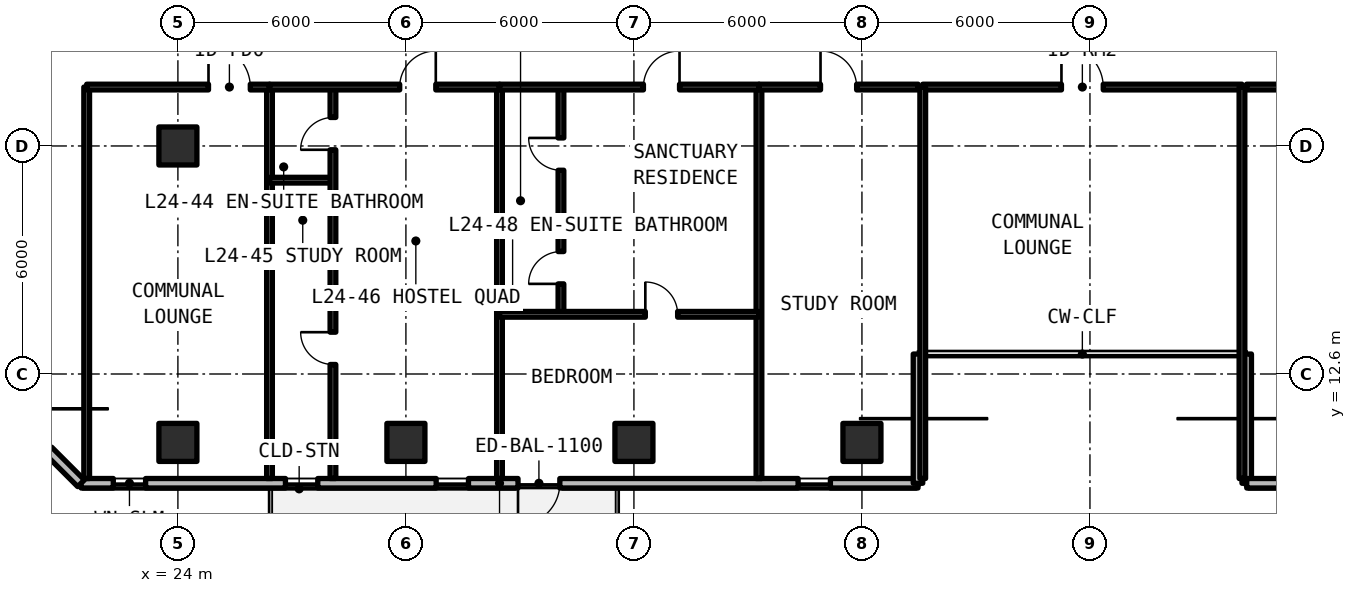
"""IFC4 building model, lengths in metres.
Left out: names, types, materials, properties, quantities, classifications, styles, units other than length and angle.
Written with IfcOpenShell. Run it as: python <this file> out.ifc"""

import sys

from ifc_helpers import new_model, si_unit, direction, frame, frame_2d, origin, origin_2d, place, context, subcontext, project, spatial, rectangle, extrude, element, fill, save


model = new_model("IFC4")
c1 = context("Model", 3, precision=1e-05, world=origin(), true_north=direction((0.0, 1.0)))
c2 = subcontext(c1, "Body", "Model", "MODEL_VIEW")
j1 = project(units=[si_unit("LENGTHUNIT", "METRE"), si_unit("PLANEANGLEUNIT", "RADIAN")], contexts=[c1])
p1 = place(None, origin())
s1 = spatial("IfcSite", under=j1, at=p1, CompositionType="ELEMENT")
p2 = place(p1, origin())
s2 = spatial("IfcBuilding", under=s1, at=p2, CompositionType="ELEMENT")
p3 = place(p2, frame((0.0, 0.0, 88.77)))
s3 = spatial("IfcBuildingStorey", under=s2, at=p3, CompositionType="ELEMENT", Elevation=88.77)
for number, where, z_axis, x_axis in (
    (1, (24.0, 18.6, 0.0), (0.0, 0.0, 1.0), (1.0, 0.0, 0.0)),
    (2, (24.0, 10.8, 0.0), (0.0, 0.0, 1.0), (1.0, 0.0, 0.0)),
    (3, (30.0, 10.8, 0.0), (0.0, 0.0, 1.0), (1.0, 0.0, 0.0)),
    (4, (36.0, 10.8, 0.0), (0.0, 0.0, 1.0), (1.0, 0.0, 0.0)),
    (5, (42.0, 10.8, 0.0), (0.0, 0.0, 1.0), (1.0, 0.0, 0.0)),
):
    element("IfcColumn", number, at=place(p3, frame(where, z_axis=z_axis, x_axis=x_axis)), inside=s3, PredefinedType="COLUMN", context=c2, shape_type="SweptSolid", body=[
        extrude(rectangle(XDim=1.0, YDim=1.0, at=origin_2d()), origin(), (0.0, 0.0, 1.0), 3.3),
    ])
p4 = place(p3, frame((21.452, 9.725, 0.0), z_axis=(0.0, 0.0, 1.0), x_axis=(1.0, 0.0, 0.0)))
e6 = element("IfcWall", 6, at=p4, inside=s3, PredefinedType="SOLIDWALL", context=c2, shape_type="SweptSolid", body=[
    extrude(rectangle(XDim=22.023, YDim=0.25, at=frame_2d((11.012, 0.0))), origin(), (0.0, 0.0, 1.0), 3.08),
])
p5 = place(p4, frame((11.498, 0.0, 0.0)))
e7 = element("IfcOpeningElement", 7, at=p5, cuts=e6, PredefinedType="OPENING", context=c2, shape_type="SweptSolid", body=[
    extrude(rectangle(XDim=1.1, YDim=2.15, at=frame_2d((0.55, 1.075))), frame((0.0, 0.135, 0.0), z_axis=(0.0, -1.0, 0.0), x_axis=(1.0, 0.0, 0.0)), (0.0, 0.0, 1.0), 0.27),
])
p6 = place(p4, frame((0.848, 0.0, 0.78)))
e8 = element("IfcOpeningElement", 8, at=p6, cuts=e6, PredefinedType="OPENING", context=c2, shape_type="SweptSolid", body=[
    extrude(rectangle(XDim=0.85, YDim=1.65, at=frame_2d((0.425, 0.825))), frame((0.0, 0.135, 0.0), z_axis=(0.0, -1.0, 0.0), x_axis=(1.0, 0.0, 0.0)), (0.0, 0.0, 1.0), 0.27),
])
p7 = place(p4, frame((5.378, 0.0, 0.78)))
e9 = element("IfcOpeningElement", 9, at=p7, cuts=e6, PredefinedType="OPENING", context=c2, shape_type="SweptSolid", body=[
    extrude(rectangle(XDim=0.85, YDim=1.65, at=frame_2d((0.425, 0.825))), frame((0.0, 0.135, 0.0), z_axis=(0.0, -1.0, 0.0), x_axis=(1.0, 0.0, 0.0)), (0.0, 0.0, 1.0), 0.27),
])
p8 = place(p4, frame((9.344, 0.0, 0.78)))
e10 = element("IfcOpeningElement", 10, at=p8, cuts=e6, PredefinedType="OPENING", context=c2, shape_type="SweptSolid", body=[
    extrude(rectangle(XDim=0.85, YDim=1.65, at=frame_2d((0.425, 0.825))), frame((0.0, 0.135, 0.0), z_axis=(0.0, -1.0, 0.0), x_axis=(1.0, 0.0, 0.0)), (0.0, 0.0, 1.0), 0.27),
])
p9 = place(p4, frame((18.868, 0.0, 0.78)))
e11 = element("IfcOpeningElement", 11, at=p9, cuts=e6, PredefinedType="OPENING", context=c2, shape_type="SweptSolid", body=[
    extrude(rectangle(XDim=0.85, YDim=1.65, at=frame_2d((0.425, 0.825))), frame((0.0, 0.135, 0.0), z_axis=(0.0, -1.0, 0.0), x_axis=(1.0, 0.0, 0.0)), (0.0, 0.0, 1.0), 0.27),
])
for number, where, z_axis, x_axis in (
    (12, (43.475, 9.725, 0.0), (0.0, 0.0, 1.0), (0.0, 1.0, 0.0)),
    (13, (52.125, 13.125, 0.0), (0.0, 0.0, 1.0), (0.0, -1.0, 0.0)),
):
    element("IfcWall", number, at=place(p3, frame(where, z_axis=z_axis, x_axis=x_axis)), inside=s3, PredefinedType="SOLIDWALL", context=c2, shape_type="SweptSolid", body=[
        extrude(rectangle(XDim=3.4, YDim=0.25, at=frame_2d((1.7, 0.0))), origin(), (0.0, 0.0, 1.0), 3.08),
    ])
p10 = place(p3, frame((52.125, 9.725, 0.0), z_axis=(0.0, 0.0, 1.0), x_axis=(1.0, 0.0, 0.0)))
e14 = element("IfcWall", 14, at=p10, inside=s3, PredefinedType="SOLIDWALL", context=c2, shape_type="SweptSolid", body=[
    extrude(rectangle(XDim=44.023, YDim=0.25, at=frame_2d((22.012, 0.0))), origin(), (0.0, 0.0, 1.0), 3.08),
])
p11 = place(p10, frame((10.875, 0.0, 0.0)))
e15 = element("IfcOpeningElement", 15, at=p11, cuts=e14, PredefinedType="OPENING", context=c2, shape_type="SweptSolid", body=[
    extrude(rectangle(XDim=1.1, YDim=2.15, at=frame_2d((0.55, 1.075))), frame((0.0, 0.135, 0.0), z_axis=(0.0, -1.0, 0.0), x_axis=(1.0, 0.0, 0.0)), (0.0, 0.0, 1.0), 0.27),
])
p12 = place(p10, frame((22.975, 0.0, 0.0)))
e16 = element("IfcOpeningElement", 16, at=p12, cuts=e14, PredefinedType="OPENING", context=c2, shape_type="SweptSolid", body=[
    extrude(rectangle(XDim=1.1, YDim=2.15, at=frame_2d((0.55, 1.075))), frame((0.0, 0.135, 0.0), z_axis=(0.0, -1.0, 0.0), x_axis=(1.0, 0.0, 0.0)), (0.0, 0.0, 1.0), 0.27),
])
p13 = place(p10, frame((35.075, 0.0, 0.0)))
e17 = element("IfcOpeningElement", 17, at=p13, cuts=e14, PredefinedType="OPENING", context=c2, shape_type="SweptSolid", body=[
    extrude(rectangle(XDim=1.1, YDim=2.15, at=frame_2d((0.55, 1.075))), frame((0.0, 0.135, 0.0), z_axis=(0.0, -1.0, 0.0), x_axis=(1.0, 0.0, 0.0)), (0.0, 0.0, 1.0), 0.27),
])
p14 = place(p10, frame((2.669, 0.0, 0.78)))
e18 = element("IfcOpeningElement", 18, at=p14, cuts=e14, PredefinedType="OPENING", context=c2, shape_type="SweptSolid", body=[
    extrude(rectangle(XDim=2.0, YDim=1.66, at=frame_2d((1.0, 0.83))), frame((0.0, 0.135, 0.0), z_axis=(0.0, -1.0, 0.0), x_axis=(1.0, 0.0, 0.0)), (0.0, 0.0, 1.0), 0.27),
])
p15 = place(p10, frame((8.314, 0.0, 0.78)))
e19 = element("IfcOpeningElement", 19, at=p15, cuts=e14, PredefinedType="OPENING", context=c2, shape_type="SweptSolid", body=[
    extrude(rectangle(XDim=0.85, YDim=1.65, at=frame_2d((0.425, 0.825))), frame((0.0, 0.135, 0.0), z_axis=(0.0, -1.0, 0.0), x_axis=(1.0, 0.0, 0.0)), (0.0, 0.0, 1.0), 0.27),
])
p16 = place(p10, frame((27.363, 0.0, 0.78)))
e20 = element("IfcOpeningElement", 20, at=p16, cuts=e14, PredefinedType="OPENING", context=c2, shape_type="SweptSolid", body=[
    extrude(rectangle(XDim=2.0, YDim=1.66, at=frame_2d((1.0, 0.83))), frame((0.0, 0.135, 0.0), z_axis=(0.0, -1.0, 0.0), x_axis=(1.0, 0.0, 0.0)), (0.0, 0.0, 1.0), 0.27),
])
p17 = place(p10, frame((40.048, 0.0, 0.78)))
e21 = element("IfcOpeningElement", 21, at=p17, cuts=e14, PredefinedType="OPENING", context=c2, shape_type="SweptSolid", body=[
    extrude(rectangle(XDim=2.0, YDim=1.66, at=frame_2d((1.0, 0.83))), frame((0.0, 0.135, 0.0), z_axis=(0.0, -1.0, 0.0), x_axis=(1.0, 0.0, 0.0)), (0.0, 0.0, 1.0), 0.27),
])
p18 = place(p3, frame((17.325, 13.852, 0.0), z_axis=(0.0, 0.0, 1.0), x_axis=(0.707127696864, -0.70708586489, 0.0)))
e22 = element("IfcWall", 22, at=p18, inside=s3, PredefinedType="SOLIDWALL", context=c2, shape_type="SweptSolid", body=[
    extrude(rectangle(XDim=5.836, YDim=0.25, at=frame_2d((2.918, 0.0))), origin(), (0.0, 0.0, 1.0), 3.08),
])
p19 = place(p18, frame((1.218, 0.0, 0.78)))
e23 = element("IfcOpeningElement", 23, at=p19, cuts=e22, PredefinedType="OPENING", context=c2, shape_type="SweptSolid", body=[
    extrude(rectangle(XDim=3.4, YDim=1.66, at=frame_2d((1.7, 0.83))), frame((0.0, 0.135, 0.0), z_axis=(0.0, -1.0, 0.0), x_axis=(1.0, 0.0, 0.0)), (0.0, 0.0, 1.0), 0.27),
])
p20 = place(p3, frame((43.6, 20.15, 0.0), z_axis=(0.0, 0.0, 1.0), x_axis=(1.0, 0.0, 0.0)))
e24 = element("IfcWall", 24, at=p20, inside=s3, PredefinedType="SOLIDWALL", context=c2, shape_type="SweptSolid", body=[
    extrude(rectangle(XDim=8.4, YDim=0.15, at=frame_2d((4.2, 0.0))), origin(), (0.0, 0.0, 1.0), 2.35),
])
p21 = place(p20, frame((3.65, 0.0, 0.0)))
e25 = element("IfcOpeningElement", 25, at=p21, cuts=e24, PredefinedType="OPENING", context=c2, shape_type="SweptSolid", body=[
    extrude(rectangle(XDim=1.1, YDim=2.15, at=frame_2d((0.55, 1.075))), frame((0.0, 0.085, 0.0), z_axis=(0.0, -1.0, 0.0), x_axis=(1.0, 0.0, 0.0)), (0.0, 0.0, 1.0), 0.17),
])
for number, where, z_axis, x_axis in (
    (26, (43.6, 9.85, 0.0), (0.0, 0.0, 1.0), (0.0, 1.0, 0.0)),
    (27, (52.0, 9.85, 0.0), (0.0, 0.0, 1.0), (0.0, 1.0, 0.0)),
    (28, (21.6, 9.85, 0.0), (0.0, 0.0, 1.0), (0.0, 1.0, 0.0)),
    (29, (26.41, 9.85, 0.0), (0.0, 0.0, 1.0), (0.0, 1.0, 0.0)),
):
    element("IfcWall", number, at=place(p3, frame(where, z_axis=z_axis, x_axis=x_axis)), inside=s3, PredefinedType="SOLIDWALL", context=c2, shape_type="SweptSolid", body=[
        extrude(rectangle(XDim=10.3, YDim=0.15, at=frame_2d((5.15, 0.0))), origin(), (0.0, 0.0, 1.0), 2.35),
    ])
p22 = place(p3, frame((21.6, 20.15, 0.0), z_axis=(0.0, 0.0, 1.0), x_axis=(1.0, 0.0, 0.0)))
e30 = element("IfcWall", 30, at=p22, inside=s3, PredefinedType="SOLIDWALL", context=c2, shape_type="SweptSolid", body=[
    extrude(rectangle(XDim=4.81, YDim=0.15, at=frame_2d((2.405, 0.0))), origin(), (0.0, 0.0, 1.0), 2.35),
])
p23 = place(p22, frame((3.205, 0.0, 0.0)))
e31 = element("IfcOpeningElement", 31, at=p23, cuts=e30, PredefinedType="OPENING", context=c2, shape_type="SweptSolid", body=[
    extrude(rectangle(XDim=1.1, YDim=2.15, at=frame_2d((0.55, 1.075))), frame((0.0, 0.085, 0.0), z_axis=(0.0, -1.0, 0.0), x_axis=(1.0, 0.0, 0.0)), (0.0, 0.0, 1.0), 0.17),
])
p24 = place(p3, frame((32.462, 9.85, 0.0), z_axis=(0.0, 0.0, 1.0), x_axis=(0.0, 1.0, 0.0)))
e32 = element("IfcWall", 32, at=p24, inside=s3, PredefinedType="SOLIDWALL", context=c2, shape_type="SweptSolid", body=[
    extrude(rectangle(XDim=10.3, YDim=0.15, at=frame_2d((5.15, 0.0))), origin(), (0.0, 0.0, 1.0), 2.35),
])
p25 = place(p3, frame((26.41, 17.7, 0.0), z_axis=(0.0, 0.0, 1.0), x_axis=(1.0, 0.0, 0.0)))
e33 = element("IfcWall", 33, at=p25, inside=s3, PredefinedType="PARTITIONING", context=c2, shape_type="SweptSolid", body=[
    extrude(rectangle(XDim=1.67, YDim=0.15, at=frame_2d((0.835, 0.0))), origin(), (0.0, 0.0, 1.0), 2.35),
])
p26 = place(p3, frame((28.08, 9.85, 0.0), z_axis=(0.0, 0.0, 1.0), x_axis=(0.0, 1.0, 0.0)))
e34 = element("IfcWall", 34, at=p26, inside=s3, PredefinedType="PARTITIONING", context=c2, shape_type="SweptSolid", body=[
    extrude(rectangle(XDim=10.3, YDim=0.15, at=frame_2d((5.15, 0.0))), origin(), (0.0, 0.0, 1.0), 2.35),
])
p27 = place(p26, frame((3.0, 0.0, 0.0)))
e35 = element("IfcOpeningElement", 35, at=p27, cuts=e34, PredefinedType="OPENING", context=c2, shape_type="SweptSolid", body=[
    extrude(rectangle(XDim=0.85, YDim=2.1, at=frame_2d((0.425, 1.05))), frame((0.0, 0.085, 0.0), z_axis=(0.0, -1.0, 0.0), x_axis=(1.0, 0.0, 0.0)), (0.0, 0.0, 1.0), 0.17),
])
p28 = place(p26, frame((8.65, 0.0, 0.0)))
e36 = element("IfcOpeningElement", 36, at=p28, cuts=e34, PredefinedType="OPENING", context=c2, shape_type="SweptSolid", body=[
    extrude(rectangle(XDim=0.85, YDim=2.1, at=frame_2d((0.425, 1.05))), frame((0.0, 0.085, 0.0), z_axis=(0.0, -1.0, 0.0), x_axis=(1.0, 0.0, 0.0)), (0.0, 0.0, 1.0), 0.17),
])
p29 = place(p3, frame((26.41, 20.15, 0.0), z_axis=(0.0, 0.0, 1.0), x_axis=(1.0, 0.0, 0.0)))
e37 = element("IfcWall", 37, at=p29, inside=s3, PredefinedType="SOLIDWALL", context=c2, shape_type="SweptSolid", body=[
    extrude(rectangle(XDim=6.052, YDim=0.15, at=frame_2d((3.026, 0.0))), origin(), (0.0, 0.0, 1.0), 2.35),
])
p30 = place(p29, frame((3.426, 0.0, 0.0)))
e38 = element("IfcOpeningElement", 38, at=p30, cuts=e37, PredefinedType="OPENING", context=c2, shape_type="SweptSolid", body=[
    extrude(rectangle(XDim=0.95, YDim=2.15, at=frame_2d((0.475, 1.075))), frame((0.0, 0.085, 0.0), z_axis=(0.0, -1.0, 0.0), x_axis=(1.0, 0.0, 0.0)), (0.0, 0.0, 1.0), 0.17),
])
p31 = place(p3, frame((39.29, 9.85, 0.0), z_axis=(0.0, 0.0, 1.0), x_axis=(0.0, 1.0, 0.0)))
e39 = element("IfcWall", 39, at=p31, inside=s3, PredefinedType="SOLIDWALL", context=c2, shape_type="SweptSolid", body=[
    extrude(rectangle(XDim=10.3, YDim=0.15, at=frame_2d((5.15, 0.0))), origin(), (0.0, 0.0, 1.0), 2.35),
])
p32 = place(p3, frame((32.462, 16.622, 0.0), z_axis=(0.0, 0.0, 1.0), x_axis=(1.0, 0.0, 0.0)))
e40 = element("IfcWall", 40, at=p32, inside=s3, PredefinedType="PARTITIONING", context=c2, shape_type="SweptSolid", body=[
    extrude(rectangle(XDim=1.618, YDim=0.15, at=frame_2d((0.809, 0.0))), origin(), (0.0, 0.0, 1.0), 2.35),
])
p33 = place(p3, frame((34.08, 14.171, 0.0), z_axis=(0.0, 0.0, 1.0), x_axis=(0.0, 1.0, 0.0)))
e41 = element("IfcWall", 41, at=p33, inside=s3, PredefinedType="PARTITIONING", context=c2, shape_type="SweptSolid", body=[
    extrude(rectangle(XDim=5.979, YDim=0.15, at=frame_2d((2.99, 0.0))), origin(), (0.0, 0.0, 1.0), 2.35),
])
p34 = place(p33, frame((0.801, 0.0, 0.0)))
e42 = element("IfcOpeningElement", 42, at=p34, cuts=e41, PredefinedType="OPENING", context=c2, shape_type="SweptSolid", body=[
    extrude(rectangle(XDim=0.85, YDim=2.1, at=frame_2d((0.425, 1.05))), frame((0.0, 0.085, 0.0), z_axis=(0.0, -1.0, 0.0), x_axis=(1.0, 0.0, 0.0)), (0.0, 0.0, 1.0), 0.17),
])
p35 = place(p33, frame((3.791, 0.0, 0.0)))
e43 = element("IfcOpeningElement", 43, at=p35, cuts=e41, PredefinedType="OPENING", context=c2, shape_type="SweptSolid", body=[
    extrude(rectangle(XDim=0.85, YDim=2.1, at=frame_2d((0.425, 1.05))), frame((0.0, 0.085, 0.0), z_axis=(0.0, -1.0, 0.0), x_axis=(1.0, 0.0, 0.0)), (0.0, 0.0, 1.0), 0.17),
])
p36 = place(p3, frame((32.462, 14.171, 0.0), z_axis=(0.0, 0.0, 1.0), x_axis=(1.0, 0.0, 0.0)))
e44 = element("IfcWall", 44, at=p36, inside=s3, PredefinedType="PARTITIONING", context=c2, shape_type="SweptSolid", body=[
    extrude(rectangle(XDim=6.828, YDim=0.15, at=frame_2d((3.414, 0.0))), origin(), (0.0, 0.0, 1.0), 2.35),
])
p37 = place(p36, frame((3.838, 0.0, 0.0)))
e45 = element("IfcOpeningElement", 45, at=p37, cuts=e44, PredefinedType="OPENING", context=c2, shape_type="SweptSolid", body=[
    extrude(rectangle(XDim=0.85, YDim=2.1, at=frame_2d((0.425, 1.05))), frame((0.0, 0.085, 0.0), z_axis=(0.0, -1.0, 0.0), x_axis=(1.0, 0.0, 0.0)), (0.0, 0.0, 1.0), 0.17),
])
p38 = place(p3, frame((32.462, 20.15, 0.0), z_axis=(0.0, 0.0, 1.0), x_axis=(1.0, 0.0, 0.0)))
e46 = element("IfcWall", 46, at=p38, inside=s3, PredefinedType="SOLIDWALL", context=c2, shape_type="SweptSolid", body=[
    extrude(rectangle(XDim=6.828, YDim=0.15, at=frame_2d((3.414, 0.0))), origin(), (0.0, 0.0, 1.0), 2.35),
])
p39 = place(p38, frame((3.788, 0.0, 0.0)))
e47 = element("IfcOpeningElement", 47, at=p39, cuts=e46, PredefinedType="OPENING", context=c2, shape_type="SweptSolid", body=[
    extrude(rectangle(XDim=0.95, YDim=2.15, at=frame_2d((0.475, 1.075))), frame((0.0, 0.085, 0.0), z_axis=(0.0, -1.0, 0.0), x_axis=(1.0, 0.0, 0.0)), (0.0, 0.0, 1.0), 0.17),
])
p40 = place(p3, frame((39.29, 20.15, 0.0), z_axis=(0.0, 0.0, 1.0), x_axis=(1.0, 0.0, 0.0)))
e48 = element("IfcWall", 48, at=p40, inside=s3, PredefinedType="SOLIDWALL", context=c2, shape_type="SweptSolid", body=[
    extrude(rectangle(XDim=4.19, YDim=0.15, at=frame_2d((2.095, 0.0))), origin(), (0.0, 0.0, 1.0), 2.35),
])
p41 = place(p40, frame((1.62, 0.0, 0.0)))
e49 = element("IfcOpeningElement", 49, at=p41, cuts=e48, PredefinedType="OPENING", context=c2, shape_type="SweptSolid", body=[
    extrude(rectangle(XDim=0.95, YDim=2.15, at=frame_2d((0.475, 1.075))), frame((0.0, 0.085, 0.0), z_axis=(0.0, -1.0, 0.0), x_axis=(1.0, 0.0, 0.0)), (0.0, 0.0, 1.0), 0.17),
])
p42 = place(p3, frame((52.12, 20.15, 0.0), z_axis=(0.0, 0.0, 1.0), x_axis=(1.0, 0.0, 0.0)))
e50 = element("IfcWall", 50, at=p42, inside=s3, PredefinedType="SOLIDWALL", context=c2, shape_type="SweptSolid", body=[
    extrude(rectangle(XDim=6.708, YDim=0.15, at=frame_2d((3.354, 0.0))), origin(), (0.0, 0.0, 1.0), 2.35),
])
p43 = place(p42, frame((2.879, 0.0, 0.0)))
e51 = element("IfcOpeningElement", 51, at=p43, cuts=e50, PredefinedType="OPENING", context=c2, shape_type="SweptSolid", body=[
    extrude(rectangle(XDim=0.95, YDim=2.15, at=frame_2d((0.475, 1.075))), frame((0.0, 0.085, 0.0), z_axis=(0.0, -1.0, 0.0), x_axis=(1.0, 0.0, 0.0)), (0.0, 0.0, 1.0), 0.17),
])
p44 = place(p5, frame((1.1, 0.0, 0.0), z_axis=(0.0, 0.0, 1.0), x_axis=(-1.0, 0.0, 0.0)))
e52 = element("IfcDoor", 52, at=p44, inside=s3, OperationType="SINGLE_SWING_RIGHT", PredefinedType="DOOR", context=c2, shape_type="SweptSolid", body=[
    extrude(rectangle(XDim=1.1, YDim=2.15, at=frame_2d((0.55, 1.075))), frame((0.0, 0.025, 0.0), z_axis=(0.0, -1.0, 0.0), x_axis=(1.0, 0.0, 0.0)), (0.0, 0.0, 1.0), 0.05),
])
fill(e7, e52)
p45 = place(p6, origin())
e53 = element("IfcWindow", 53, at=p45, inside=s3, PartitioningType="SINGLE_PANEL", PredefinedType="WINDOW", context=c2, shape_type="SweptSolid", body=[
    extrude(rectangle(XDim=0.85, YDim=1.65, at=frame_2d((0.425, 0.825))), frame((0.0, 0.03, 0.0), z_axis=(0.0, -1.0, 0.0), x_axis=(1.0, 0.0, 0.0)), (0.0, 0.0, 1.0), 0.06),
])
fill(e8, e53)
p46 = place(p7, origin())
e54 = element("IfcWindow", 54, at=p46, inside=s3, PartitioningType="SINGLE_PANEL", PredefinedType="WINDOW", context=c2, shape_type="SweptSolid", body=[
    extrude(rectangle(XDim=0.85, YDim=1.65, at=frame_2d((0.425, 0.825))), frame((0.0, 0.03, 0.0), z_axis=(0.0, -1.0, 0.0), x_axis=(1.0, 0.0, 0.0)), (0.0, 0.0, 1.0), 0.06),
])
fill(e9, e54)
p47 = place(p8, origin())
e55 = element("IfcWindow", 55, at=p47, inside=s3, PartitioningType="SINGLE_PANEL", PredefinedType="WINDOW", context=c2, shape_type="SweptSolid", body=[
    extrude(rectangle(XDim=0.85, YDim=1.65, at=frame_2d((0.425, 0.825))), frame((0.0, 0.03, 0.0), z_axis=(0.0, -1.0, 0.0), x_axis=(1.0, 0.0, 0.0)), (0.0, 0.0, 1.0), 0.06),
])
fill(e10, e55)
p48 = place(p9, origin())
e56 = element("IfcWindow", 56, at=p48, inside=s3, PartitioningType="SINGLE_PANEL", PredefinedType="WINDOW", context=c2, shape_type="SweptSolid", body=[
    extrude(rectangle(XDim=0.85, YDim=1.65, at=frame_2d((0.425, 0.825))), frame((0.0, 0.03, 0.0), z_axis=(0.0, -1.0, 0.0), x_axis=(1.0, 0.0, 0.0)), (0.0, 0.0, 1.0), 0.06),
])
fill(e11, e56)
p49 = place(p21, origin())
e57 = element("IfcDoor", 57, at=p49, inside=s3, OperationType="SINGLE_SWING_LEFT", PredefinedType="DOOR", context=c2, shape_type="SweptSolid", body=[
    extrude(rectangle(XDim=1.1, YDim=2.15, at=frame_2d((0.55, 1.075))), frame((0.0, 0.025, 0.0), z_axis=(0.0, -1.0, 0.0), x_axis=(1.0, 0.0, 0.0)), (0.0, 0.0, 1.0), 0.05),
])
fill(e25, e57)
p50 = place(p23, origin())
e58 = element("IfcDoor", 58, at=p50, inside=s3, OperationType="SINGLE_SWING_LEFT", PredefinedType="DOOR", context=c2, shape_type="SweptSolid", body=[
    extrude(rectangle(XDim=1.1, YDim=2.15, at=frame_2d((0.55, 1.075))), frame((0.0, 0.025, 0.0), z_axis=(0.0, -1.0, 0.0), x_axis=(1.0, 0.0, 0.0)), (0.0, 0.0, 1.0), 0.05),
])
fill(e31, e58)
p51 = place(p27, origin())
e59 = element("IfcDoor", 59, at=p51, inside=s3, OperationType="SINGLE_SWING_RIGHT", PredefinedType="DOOR", context=c2, shape_type="SweptSolid", body=[
    extrude(rectangle(XDim=0.85, YDim=2.1, at=frame_2d((0.425, 1.05))), frame((0.0, 0.025, 0.0), z_axis=(0.0, -1.0, 0.0), x_axis=(1.0, 0.0, 0.0)), (0.0, 0.0, 1.0), 0.05),
])
fill(e35, e59)
p52 = place(p28, origin())
e60 = element("IfcDoor", 60, at=p52, inside=s3, OperationType="SINGLE_SWING_LEFT", PredefinedType="DOOR", context=c2, shape_type="SweptSolid", body=[
    extrude(rectangle(XDim=0.85, YDim=2.1, at=frame_2d((0.425, 1.05))), frame((0.0, 0.025, 0.0), z_axis=(0.0, -1.0, 0.0), x_axis=(1.0, 0.0, 0.0)), (0.0, 0.0, 1.0), 0.05),
])
fill(e36, e60)
p53 = place(p30, origin())
e61 = element("IfcDoor", 61, at=p53, inside=s3, OperationType="SINGLE_SWING_RIGHT", PredefinedType="DOOR", context=c2, shape_type="SweptSolid", body=[
    extrude(rectangle(XDim=0.95, YDim=2.15, at=frame_2d((0.475, 1.075))), frame((0.0, 0.025, 0.0), z_axis=(0.0, -1.0, 0.0), x_axis=(1.0, 0.0, 0.0)), (0.0, 0.0, 1.0), 0.05),
])
fill(e38, e61)
p54 = place(p34, origin())
e62 = element("IfcDoor", 62, at=p54, inside=s3, OperationType="SINGLE_SWING_LEFT", PredefinedType="DOOR", context=c2, shape_type="SweptSolid", body=[
    extrude(rectangle(XDim=0.85, YDim=2.1, at=frame_2d((0.425, 1.05))), frame((0.0, 0.025, 0.0), z_axis=(0.0, -1.0, 0.0), x_axis=(1.0, 0.0, 0.0)), (0.0, 0.0, 1.0), 0.05),
])
fill(e42, e62)
p55 = place(p35, origin())
e63 = element("IfcDoor", 63, at=p55, inside=s3, OperationType="SINGLE_SWING_RIGHT", PredefinedType="DOOR", context=c2, shape_type="SweptSolid", body=[
    extrude(rectangle(XDim=0.85, YDim=2.1, at=frame_2d((0.425, 1.05))), frame((0.0, 0.025, 0.0), z_axis=(0.0, -1.0, 0.0), x_axis=(1.0, 0.0, 0.0)), (0.0, 0.0, 1.0), 0.05),
])
fill(e43, e63)
p56 = place(p37, origin())
e64 = element("IfcDoor", 64, at=p56, inside=s3, OperationType="SINGLE_SWING_LEFT", PredefinedType="DOOR", context=c2, shape_type="SweptSolid", body=[
    extrude(rectangle(XDim=0.85, YDim=2.1, at=frame_2d((0.425, 1.05))), frame((0.0, 0.025, 0.0), z_axis=(0.0, -1.0, 0.0), x_axis=(1.0, 0.0, 0.0)), (0.0, 0.0, 1.0), 0.05),
])
fill(e45, e64)
p57 = place(p39, origin())
e65 = element("IfcDoor", 65, at=p57, inside=s3, OperationType="SINGLE_SWING_RIGHT", PredefinedType="DOOR", context=c2, shape_type="SweptSolid", body=[
    extrude(rectangle(XDim=0.95, YDim=2.15, at=frame_2d((0.475, 1.075))), frame((0.0, 0.025, 0.0), z_axis=(0.0, -1.0, 0.0), x_axis=(1.0, 0.0, 0.0)), (0.0, 0.0, 1.0), 0.05),
])
fill(e47, e65)
p58 = place(p41, origin())
e66 = element("IfcDoor", 66, at=p58, inside=s3, OperationType="SINGLE_SWING_LEFT", PredefinedType="DOOR", context=c2, shape_type="SweptSolid", body=[
    extrude(rectangle(XDim=0.95, YDim=2.15, at=frame_2d((0.475, 1.075))), frame((0.0, 0.025, 0.0), z_axis=(0.0, -1.0, 0.0), x_axis=(1.0, 0.0, 0.0)), (0.0, 0.0, 1.0), 0.05),
])
fill(e49, e66)
save(model, sys.argv[1])
